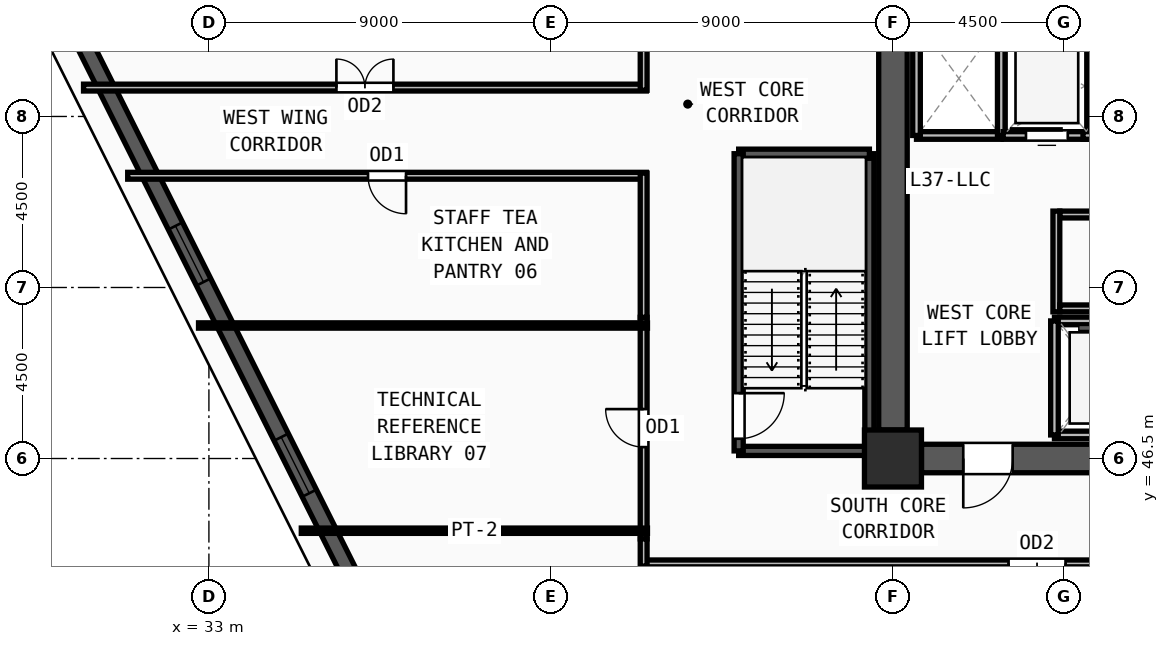
"""IFC4 building model, lengths in metres.
Left out: names, types, materials, properties, quantities, classifications, styles, units other than length and angle.
Written with IfcOpenShell. Run it as: python <this file> out.ifc"""

import sys

from ifc_helpers import new_model, si_unit, direction, frame, frame_2d, origin, origin_2d, place, context, subcontext, project, spatial, rectangle, extrude, source, transform, mapped, element, fill, save


model = new_model("IFC4")
c1 = context("Model", 3, precision=1e-05, world=origin(), true_north=direction((0.0, 1.0)))
c2 = subcontext(c1, "Body", "Model", "MODEL_VIEW")
j1 = project(units=[si_unit("LENGTHUNIT", "METRE"), si_unit("PLANEANGLEUNIT", "RADIAN")], contexts=[c1])
p1 = place(None, origin())
s1 = spatial("IfcSite", under=j1, at=p1, CompositionType="ELEMENT")
p2 = place(p1, origin())
s2 = spatial("IfcBuilding", under=s1, at=p2, CompositionType="ELEMENT")
p3 = place(p2, frame((0.0, 0.0, 144.0)))
s3 = spatial("IfcBuildingStorey", under=s2, at=p3, CompositionType="ELEMENT", Elevation=144.0)
m1 = source(origin(), c2, "Body", "SweptSolid", [
    extrude(rectangle(XDim=1.5, YDim=1.5, at=origin_2d()), origin(), (0.0, 0.0, 1.0), 3.75),
])
p4 = place(p3, frame((51.0, 46.5, 0.0), z_axis=(0.0, 0.0, 1.0), x_axis=(1.0, 0.0, 0.0)))
e1 = element("IfcColumn", 1, at=p4, inside=s3, PredefinedType="COLUMN", context=c2, shape_type="MappedRepresentation", body=[
    mapped(m1, transform((0.0, 0.0, 0.0), x_axis=(1.0, 0.0, 0.0), y_axis=(0.0, 1.0, 0.0), z_axis=(0.0, 0.0, 1.0), scale=1.0)),
])
p5 = place(p3, frame((24.842, 67.153, 0.0), z_axis=(0.0, 0.0, 1.0), x_axis=(0.447741761442, -0.894162913043, 0.0)))
e2 = element("IfcWall", 2, at=p5, inside=s3, PredefinedType="SOLIDWALL", context=c2, shape_type="SweptSolid", body=[
    extrude(rectangle(XDim=31.058, YDim=0.42, at=frame_2d((15.529, 0.0))), origin(), (0.0, 0.0, 1.0), 3.57),
])
m2 = source(origin(), c2, "Body", "SweptSolid", [
    extrude(rectangle(XDim=1.65, YDim=1.95, at=frame_2d((0.825, 0.975))), frame((0.0, 0.22, 0.0), z_axis=(0.0, -1.0, 0.0), x_axis=(1.0, 0.0, 0.0)), (0.0, 0.0, 1.0), 0.44),
])
p6 = place(p5, frame((6.94, 0.0, 0.55)))
e3 = element("IfcOpeningElement", 3, at=p6, cuts=e2, PredefinedType="OPENING", context=c2, shape_type="MappedRepresentation", body=[
    mapped(m2, transform((0.0, 0.0, 0.0), x_axis=(1.0, 0.0, 0.0), y_axis=(0.0, 1.0, 0.0), z_axis=(0.0, 0.0, 1.0), scale=1.0)),
])
p7 = place(p5, frame((16.254, 0.0, 0.55)))
e4 = element("IfcOpeningElement", 4, at=p7, cuts=e2, PredefinedType="OPENING", context=c2, shape_type="MappedRepresentation", body=[
    mapped(m2, transform((0.0, 0.0, 0.0), x_axis=(1.0, 0.0, 0.0), y_axis=(0.0, 1.0, 0.0), z_axis=(0.0, 0.0, 1.0), scale=1.0)),
])
p8 = place(p5, frame((22.469, 0.0, 0.55)))
e5 = element("IfcOpeningElement", 5, at=p8, cuts=e2, PredefinedType="OPENING", context=c2, shape_type="MappedRepresentation", body=[
    mapped(m2, transform((0.0, 0.0, 0.0), x_axis=(1.0, 0.0, 0.0), y_axis=(0.0, 1.0, 0.0), z_axis=(0.0, 0.0, 1.0), scale=1.0)),
])
p9 = place(p3, frame((59.25, 46.5, 0.0), z_axis=(0.0, 0.0, 1.0), x_axis=(-1.0, 0.0, 0.0)))
e6 = element("IfcWall", 6, at=p9, inside=s3, PredefinedType="SHEAR", context=c2, shape_type="SweptSolid", body=[
    extrude(rectangle(XDim=7.5, YDim=0.75, at=frame_2d((3.75, 0.0))), origin(), (0.0, 0.0, 1.0), 3.57),
])
m3 = source(origin(), c2, "Body", "SweptSolid", [
    extrude(rectangle(XDim=1.3, YDim=2.2, at=frame_2d((0.65, 1.1))), frame((0.0, 0.385, 0.0), z_axis=(0.0, -1.0, 0.0), x_axis=(1.0, 0.0, 0.0)), (0.0, 0.0, 1.0), 0.77),
])
p10 = place(p9, frame((5.1, 0.0, 0.0)))
e7 = element("IfcOpeningElement", 7, at=p10, cuts=e6, PredefinedType="OPENING", context=c2, shape_type="MappedRepresentation", body=[
    mapped(m3, transform((0.0, 0.0, 0.0), x_axis=(1.0, 0.0, 0.0), y_axis=(0.0, 1.0, 0.0), z_axis=(0.0, 0.0, 1.0), scale=1.0)),
])
m4 = source(origin(), c2, "Body", "SweptSolid", [
    extrude(rectangle(XDim=1.0, YDim=2.2, at=frame_2d((0.5, 1.1))), frame((0.0, 0.385, 0.0), z_axis=(0.0, -1.0, 0.0), x_axis=(1.0, 0.0, 0.0)), (0.0, 0.0, 1.0), 0.77),
])
p11 = place(p9, frame((0.6, 0.0, 0.0)))
e8 = element("IfcOpeningElement", 8, at=p11, cuts=e6, PredefinedType="OPENING", context=c2, shape_type="MappedRepresentation", body=[
    mapped(m4, transform((0.0, 0.0, 0.0), x_axis=(1.0, 0.0, 0.0), y_axis=(0.0, 1.0, 0.0), z_axis=(0.0, 0.0, 1.0), scale=1.0)),
])
p12 = place(p3, frame((51.0, 47.25, 0.0), z_axis=(0.0, 0.0, 1.0), x_axis=(0.0, 1.0, 0.0)))
e9 = element("IfcWall", 9, at=p12, inside=s3, PredefinedType="SHEAR", context=c2, shape_type="SweptSolid", body=[
    extrude(rectangle(XDim=13.5, YDim=0.75, at=frame_2d((6.75, 0.0))), origin(), (0.0, 0.0, 1.0), 3.57),
])
p13 = place(p3, frame((46.94, 46.7, 0.0), z_axis=(0.0, 0.0, 1.0), x_axis=(1.0, 0.0, 0.0)))
e10 = element("IfcWall", 10, at=p13, inside=s3, PredefinedType="SOLIDWALL", context=c2, shape_type="SweptSolid", body=[
    extrude(rectangle(XDim=3.44, YDim=0.24, at=frame_2d((1.72, 0.0))), origin(), (0.0, 0.0, 1.0), 3.57),
])
p14 = place(p3, frame((50.38, 46.7, 0.0), z_axis=(0.0, 0.0, 1.0), x_axis=(0.0, 1.0, 0.0)))
e11 = element("IfcWall", 11, at=p14, inside=s3, PredefinedType="SOLIDWALL", context=c2, shape_type="SweptSolid", body=[
    extrude(rectangle(XDim=7.82, YDim=0.24, at=frame_2d((3.91, 0.0))), origin(), (0.0, 0.0, 1.0), 3.57),
])
p15 = place(p3, frame((50.38, 54.52, 0.0), z_axis=(0.0, 0.0, 1.0), x_axis=(-1.0, 0.0, 0.0)))
e12 = element("IfcWall", 12, at=p15, inside=s3, PredefinedType="SOLIDWALL", context=c2, shape_type="SweptSolid", body=[
    extrude(rectangle(XDim=3.44, YDim=0.24, at=frame_2d((1.72, 0.0))), origin(), (0.0, 0.0, 1.0), 3.57),
])
p16 = place(p3, frame((46.94, 54.52, 0.0), z_axis=(0.0, 0.0, 1.0), x_axis=(0.0, -1.0, 0.0)))
e13 = element("IfcWall", 13, at=p16, inside=s3, PredefinedType="SOLIDWALL", context=c2, shape_type="SweptSolid", body=[
    extrude(rectangle(XDim=7.82, YDim=0.24, at=frame_2d((3.91, 0.0))), origin(), (0.0, 0.0, 1.0), 3.57),
])
m5 = source(origin(), c2, "Body", "SweptSolid", [
    extrude(rectangle(XDim=1.2, YDim=2.2, at=frame_2d((0.6, 1.1))), frame((0.0, 0.13, 0.0), z_axis=(0.0, -1.0, 0.0), x_axis=(1.0, 0.0, 0.0)), (0.0, 0.0, 1.0), 0.26),
])
p17 = place(p16, frame((6.3, 0.0, 0.0)))
e14 = element("IfcOpeningElement", 14, at=p17, cuts=e13, PredefinedType="OPENING", context=c2, shape_type="MappedRepresentation", body=[
    mapped(m5, transform((0.0, 0.0, 0.0), x_axis=(1.0, 0.0, 0.0), y_axis=(0.0, 1.0, 0.0), z_axis=(0.0, 0.0, 1.0), scale=1.0)),
])
for number, where, z_axis, x_axis in (
    (15, (55.25, 47.12, 0.0), (0.0, 0.0, 1.0), (1.0, 0.0, 0.0)),
    (16, (57.65, 50.12, 0.0), (0.0, 0.0, 1.0), (-1.0, 0.0, 0.0)),
):
    element("IfcWall", number, at=place(p3, frame(where, z_axis=z_axis, x_axis=x_axis)), inside=s3, PredefinedType="SOLIDWALL", context=c2, shape_type="SweptSolid", body=[
        extrude(rectangle(XDim=2.4, YDim=0.2, at=frame_2d((1.2, 0.0))), origin(), (0.0, 0.0, 1.0), 3.57),
    ])
p18 = place(p3, frame((55.25, 50.12, 0.0), z_axis=(0.0, 0.0, 1.0), x_axis=(0.0, -1.0, 0.0)))
e17 = element("IfcWall", 17, at=p18, inside=s3, PredefinedType="SOLIDWALL", context=c2, shape_type="SweptSolid", body=[
    extrude(rectangle(XDim=3.0, YDim=0.2, at=frame_2d((1.5, 0.0))), origin(), (0.0, 0.0, 1.0), 3.57),
])
p19 = place(p3, frame((51.62, 55.0, 0.0), z_axis=(0.0, 0.0, 1.0), x_axis=(1.0, 0.0, 0.0)))
e18 = element("IfcWall", 18, at=p19, inside=s3, PredefinedType="SOLIDWALL", context=c2, shape_type="SweptSolid", body=[
    extrude(rectangle(XDim=2.23, YDim=0.2, at=frame_2d((1.115, 0.0))), origin(), (0.0, 0.0, 1.0), 3.57),
])
for number, where, z_axis, x_axis in (
    (19, (53.85, 55.0, 0.0), (0.0, 0.0, 1.0), (0.0, 1.0, 0.0)),
    (20, (51.62, 58.0, 0.0), (0.0, 0.0, 1.0), (0.0, -1.0, 0.0)),
):
    element("IfcWall", number, at=place(p3, frame(where, z_axis=z_axis, x_axis=x_axis)), inside=s3, PredefinedType="SOLIDWALL", context=c2, shape_type="SweptSolid", body=[
        extrude(rectangle(XDim=3.0, YDim=0.2, at=frame_2d((1.5, 0.0))), origin(), (0.0, 0.0, 1.0), 3.57),
    ])
p20 = place(p3, frame((53.9, 55.0, 0.0), z_axis=(0.0, 0.0, 1.0), x_axis=(1.0, 0.0, 0.0)))
e21 = element("IfcWall", 21, at=p20, inside=s3, PredefinedType="SOLIDWALL", context=c2, shape_type="SweptSolid", body=[
    extrude(rectangle(XDim=2.3, YDim=0.2, at=frame_2d((1.15, 0.0))), origin(), (0.0, 0.0, 1.0), 3.57),
])
m6 = source(origin(), c2, "Body", "SweptSolid", [
    extrude(rectangle(XDim=1.1, YDim=2.2, at=frame_2d((0.55, 1.1))), frame((0.0, 0.11, 0.0), z_axis=(0.0, -1.0, 0.0), x_axis=(1.0, 0.0, 0.0)), (0.0, 0.0, 1.0), 0.22),
])
p21 = place(p20, frame((0.6, 0.0, 0.0)))
e22 = element("IfcOpeningElement", 22, at=p21, cuts=e21, PredefinedType="OPENING", context=c2, shape_type="MappedRepresentation", body=[
    mapped(m6, transform((0.0, 0.0, 0.0), x_axis=(1.0, 0.0, 0.0), y_axis=(0.0, 1.0, 0.0), z_axis=(0.0, 0.0, 1.0), scale=1.0)),
])
p22 = place(p3, frame((56.2, 55.0, 0.0), z_axis=(0.0, 0.0, 1.0), x_axis=(0.0, 1.0, 0.0)))
e23 = element("IfcWall", 23, at=p22, inside=s3, PredefinedType="SOLIDWALL", context=c2, shape_type="SweptSolid", body=[
    extrude(rectangle(XDim=2.6, YDim=0.2, at=frame_2d((1.3, 0.0))), origin(), (0.0, 0.0, 1.0), 3.57),
])
p23 = place(p3, frame((56.0, 55.0, 0.0), z_axis=(0.0, 0.0, 1.0), x_axis=(1.0, 0.0, 0.0)))
e24 = element("IfcWall", 24, at=p23, inside=s3, PredefinedType="SOLIDWALL", context=c2, shape_type="SweptSolid", body=[
    extrude(rectangle(XDim=2.2, YDim=0.2, at=frame_2d((1.1, 0.0))), origin(), (0.0, 0.0, 1.0), 3.57),
])
p24 = place(p23, frame((0.55, 0.0, 0.0)))
e25 = element("IfcOpeningElement", 25, at=p24, cuts=e24, PredefinedType="OPENING", context=c2, shape_type="MappedRepresentation", body=[
    mapped(m6, transform((0.0, 0.0, 0.0), x_axis=(1.0, 0.0, 0.0), y_axis=(0.0, 1.0, 0.0), z_axis=(0.0, 0.0, 1.0), scale=1.0)),
])
p25 = place(p3, frame((55.39, 52.92, 0.0), z_axis=(0.0, 0.0, 1.0), x_axis=(1.0, 0.0, 0.0)))
e26 = element("IfcWall", 26, at=p25, inside=s3, PredefinedType="PARTITIONING", context=c2, shape_type="SweptSolid", body=[
    extrude(rectangle(XDim=6.91, YDim=0.18, at=frame_2d((3.455, 0.0))), origin(), (0.0, 0.0, 1.0), 3.57),
])
m7 = source(origin(), c2, "Body", "SweptSolid", [
    extrude(rectangle(XDim=0.85, YDim=2.1, at=frame_2d((0.425, 1.05))), frame((0.0, 0.1, 0.0), z_axis=(0.0, -1.0, 0.0), x_axis=(1.0, 0.0, 0.0)), (0.0, 0.0, 1.0), 0.2),
])
p26 = place(p25, frame((3.035, 0.0, 0.0)))
e27 = element("IfcOpeningElement", 27, at=p26, cuts=e26, PredefinedType="OPENING", context=c2, shape_type="MappedRepresentation", body=[
    mapped(m7, transform((0.0, 0.0, 0.0), x_axis=(1.0, 0.0, 0.0), y_axis=(0.0, 1.0, 0.0), z_axis=(0.0, 0.0, 1.0), scale=1.0)),
])
p27 = place(p3, frame((29.701, 56.26, 0.0), z_axis=(0.0, 0.0, 1.0), x_axis=(1.0, 0.0, 0.0)))
e28 = element("IfcWall", 28, at=p27, inside=s3, PredefinedType="PARTITIONING", context=c2, shape_type="SweptSolid", body=[
    extrude(rectangle(XDim=14.809, YDim=0.18, at=frame_2d((7.405, 0.0))), origin(), (0.0, 0.0, 1.0), 3.57),
])
m8 = source(origin(), c2, "Body", "SweptSolid", [
    extrude(rectangle(XDim=1.5, YDim=2.2, at=frame_2d((0.75, 1.1))), frame((0.0, 0.1, 0.0), z_axis=(0.0, -1.0, 0.0), x_axis=(1.0, 0.0, 0.0)), (0.0, 0.0, 1.0), 0.2),
])
p28 = place(p27, frame((6.654, 0.0, 0.0)))
e29 = element("IfcOpeningElement", 29, at=p28, cuts=e28, PredefinedType="OPENING", context=c2, shape_type="MappedRepresentation", body=[
    mapped(m8, transform((0.0, 0.0, 0.0), x_axis=(1.0, 0.0, 0.0), y_axis=(0.0, 1.0, 0.0), z_axis=(0.0, 0.0, 1.0), scale=1.0)),
])
p29 = place(p3, frame((44.51, 53.94, 0.0), z_axis=(0.0, 0.0, 1.0), x_axis=(-1.0, 0.0, 0.0)))
e30 = element("IfcWall", 30, at=p29, inside=s3, PredefinedType="PARTITIONING", context=c2, shape_type="SweptSolid", body=[
    extrude(rectangle(XDim=13.647, YDim=0.18, at=frame_2d((6.823, 0.0))), origin(), (0.0, 0.0, 1.0), 3.57),
])
m9 = source(origin(), c2, "Body", "SweptSolid", [
    extrude(rectangle(XDim=1.0, YDim=2.2, at=frame_2d((0.5, 1.1))), frame((0.0, 0.1, 0.0), z_axis=(0.0, -1.0, 0.0), x_axis=(1.0, 0.0, 0.0)), (0.0, 0.0, 1.0), 0.2),
])
p30 = place(p29, frame((6.323, 0.0, 0.0)))
e31 = element("IfcOpeningElement", 31, at=p30, cuts=e30, PredefinedType="OPENING", context=c2, shape_type="MappedRepresentation", body=[
    mapped(m9, transform((0.0, 0.0, 0.0), x_axis=(1.0, 0.0, 0.0), y_axis=(0.0, 1.0, 0.0), z_axis=(0.0, 0.0, 1.0), scale=1.0)),
])
p31 = place(p3, frame((44.44, 44.385, 0.0), z_axis=(0.0, 0.0, 1.0), x_axis=(0.0, 1.0, 0.0)))
e32 = element("IfcWall", 32, at=p31, inside=s3, PredefinedType="PARTITIONING", context=c2, shape_type="SweptSolid", body=[
    extrude(rectangle(XDim=5.83, YDim=0.18, at=frame_2d((2.915, 0.0))), origin(), (0.0, 0.0, 1.0), 3.57),
])
p32 = place(p31, frame((2.415, 0.0, 0.0)))
e33 = element("IfcOpeningElement", 33, at=p32, cuts=e32, PredefinedType="OPENING", context=c2, shape_type="MappedRepresentation", body=[
    mapped(m9, transform((0.0, 0.0, 0.0), x_axis=(1.0, 0.0, 0.0), y_axis=(0.0, 1.0, 0.0), z_axis=(0.0, 0.0, 1.0), scale=1.0)),
])
p33 = place(p3, frame((65.215, 43.74, 0.0), z_axis=(0.0, 0.0, 1.0), x_axis=(-1.0, 0.0, 0.0)))
e34 = element("IfcWall", 34, at=p33, inside=s3, PredefinedType="PARTITIONING", context=c2, shape_type="SweptSolid", body=[
    extrude(rectangle(XDim=20.845, YDim=0.18, at=frame_2d((10.422, 0.0))), origin(), (0.0, 0.0, 1.0), 3.57),
])
p34 = place(p33, frame((9.673, 0.0, 0.0)))
e35 = element("IfcOpeningElement", 35, at=p34, cuts=e34, PredefinedType="OPENING", context=c2, shape_type="MappedRepresentation", body=[
    mapped(m8, transform((0.0, 0.0, 0.0), x_axis=(1.0, 0.0, 0.0), y_axis=(0.0, 1.0, 0.0), z_axis=(0.0, 0.0, 1.0), scale=1.0)),
])
p35 = place(p3, frame((44.44, 56.19, 0.0), z_axis=(0.0, 0.0, 1.0), x_axis=(0.0, 1.0, 0.0)))
e36 = element("IfcWall", 36, at=p35, inside=s3, PredefinedType="PARTITIONING", context=c2, shape_type="SweptSolid", body=[
    extrude(rectangle(XDim=10.595, YDim=0.18, at=frame_2d((5.297, 0.0))), origin(), (0.0, 0.0, 1.0), 3.57),
])
p36 = place(p3, frame((44.44, 50.215, 0.0), z_axis=(0.0, 0.0, 1.0), x_axis=(0.0, 1.0, 0.0)))
e37 = element("IfcWall", 37, at=p36, inside=s3, PredefinedType="PARTITIONING", context=c2, shape_type="SweptSolid", body=[
    extrude(rectangle(XDim=3.795, YDim=0.18, at=frame_2d((1.897, 0.0))), origin(), (0.0, 0.0, 1.0), 3.57),
])
p37 = place(p3, frame((44.44, 43.67, 0.0), z_axis=(0.0, 0.0, 1.0), x_axis=(0.0, 1.0, 0.0)))
e38 = element("IfcWall", 38, at=p37, inside=s3, PredefinedType="PARTITIONING", context=c2, shape_type="SweptSolid", body=[
    extrude(rectangle(XDim=0.715, YDim=0.18, at=frame_2d((0.357, 0.0))), origin(), (0.0, 0.0, 1.0), 3.57),
])
p38 = place(p3, frame((44.54, 44.6, 0.0), z_axis=(0.0, 0.0, 1.0), x_axis=(-1.0, 0.0, 0.0)))
e39 = element("IfcWall", 39, at=p38, inside=s3, PredefinedType="PARTITIONING", context=c2, shape_type="SweptSolid", body=[
    extrude(rectangle(XDim=9.109, YDim=0.14, at=frame_2d((4.555, 0.0))), origin(), (0.0, 0.0, 1.0), 3.57),
])
p39 = place(p3, frame((44.54, 50.0, 0.0), z_axis=(0.0, 0.0, 1.0), x_axis=(-1.0, 0.0, 0.0)))
e40 = element("IfcWall", 40, at=p39, inside=s3, PredefinedType="PARTITIONING", context=c2, shape_type="SweptSolid", body=[
    extrude(rectangle(XDim=11.813, YDim=0.14, at=frame_2d((5.906, 0.0))), origin(), (0.0, 0.0, 1.0), 3.57),
])
p40 = place(p3, frame((55.3, 50.36, 0.0), z_axis=(0.0, 0.0, 1.0), x_axis=(0.0, 1.0, 0.0)))
e41 = element("IfcWall", 41, at=p40, inside=s3, PredefinedType="PARTITIONING", context=c2, shape_type="SweptSolid", body=[
    extrude(rectangle(XDim=2.65, YDim=0.18, at=frame_2d((1.325, 0.0))), origin(), (0.0, 0.0, 1.0), 3.57),
])
p41 = place(p3, frame((55.39, 50.45, 0.0), z_axis=(0.0, 0.0, 1.0), x_axis=(1.0, 0.0, 0.0)))
e42 = element("IfcWall", 42, at=p41, inside=s3, PredefinedType="PARTITIONING", context=c2, shape_type="SweptSolid", body=[
    extrude(rectangle(XDim=6.91, YDim=0.18, at=frame_2d((3.455, 0.0))), origin(), (0.0, 0.0, 1.0), 3.57),
])
m10 = source(origin(), c2, "Body", "SweptSolid", [
    extrude(rectangle(XDim=1.65, YDim=1.95, at=frame_2d((0.825, 0.975))), frame((0.0, 0.03, 0.0), z_axis=(0.0, -1.0, 0.0), x_axis=(1.0, 0.0, 0.0)), (0.0, 0.0, 1.0), 0.06),
])
p42 = place(p7, origin())
e43 = element("IfcWindow", 43, at=p42, inside=s3, PartitioningType="DOUBLE_PANEL_VERTICAL", PredefinedType="WINDOW", context=c2, shape_type="MappedRepresentation", body=[
    mapped(m10, transform((0.0, 0.0, 0.0), x_axis=(1.0, 0.0, 0.0), y_axis=(0.0, 1.0, 0.0), z_axis=(0.0, 0.0, 1.0), scale=1.0)),
])
fill(e4, e43)
p43 = place(p8, origin())
e44 = element("IfcWindow", 44, at=p43, inside=s3, PartitioningType="DOUBLE_PANEL_VERTICAL", PredefinedType="WINDOW", context=c2, shape_type="MappedRepresentation", body=[
    mapped(m10, transform((0.0, 0.0, 0.0), x_axis=(1.0, 0.0, 0.0), y_axis=(0.0, 1.0, 0.0), z_axis=(0.0, 0.0, 1.0), scale=1.0)),
])
fill(e5, e44)
m11 = source(origin(), c2, "Body", "SweptSolid", [
    extrude(rectangle(XDim=1.3, YDim=2.2, at=frame_2d((0.65, 1.1))), frame((0.0, 0.025, 0.0), z_axis=(0.0, -1.0, 0.0), x_axis=(1.0, 0.0, 0.0)), (0.0, 0.0, 1.0), 0.05),
])
p44 = place(p10, origin())
e45 = element("IfcDoor", 45, at=p44, inside=s3, OperationType="SINGLE_SWING_RIGHT", PredefinedType="DOOR", context=c2, shape_type="MappedRepresentation", body=[
    mapped(m11, transform((0.0, 0.0, 0.0), x_axis=(1.0, 0.0, 0.0), y_axis=(0.0, 1.0, 0.0), z_axis=(0.0, 0.0, 1.0), scale=1.0)),
])
fill(e7, e45)
m12 = source(origin(), c2, "Body", "SweptSolid", [
    extrude(rectangle(XDim=1.2, YDim=2.2, at=frame_2d((0.6, 1.1))), frame((0.0, 0.025, 0.0), z_axis=(0.0, -1.0, 0.0), x_axis=(1.0, 0.0, 0.0)), (0.0, 0.0, 1.0), 0.05),
])
p45 = place(p17, origin())
e46 = element("IfcDoor", 46, at=p45, inside=s3, OperationType="SINGLE_SWING_LEFT", PredefinedType="DOOR", context=c2, shape_type="MappedRepresentation", body=[
    mapped(m12, transform((0.0, 0.0, 0.0), x_axis=(1.0, 0.0, 0.0), y_axis=(0.0, 1.0, 0.0), z_axis=(0.0, 0.0, 1.0), scale=1.0)),
])
fill(e14, e46)
m13 = source(origin(), c2, "Body", "SweptSolid", [
    extrude(rectangle(XDim=1.1, YDim=2.2, at=frame_2d((0.55, 1.1))), frame((0.0, 0.025, 0.0), z_axis=(0.0, -1.0, 0.0), x_axis=(1.0, 0.0, 0.0)), (0.0, 0.0, 1.0), 0.05),
])
p46 = place(p21, origin())
e47 = element("IfcDoor", 47, at=p46, inside=s3, OperationType="SLIDING_TO_LEFT", PredefinedType="DOOR", context=c2, shape_type="MappedRepresentation", body=[
    mapped(m13, transform((0.0, 0.0, 0.0), x_axis=(1.0, 0.0, 0.0), y_axis=(0.0, 1.0, 0.0), z_axis=(0.0, 0.0, 1.0), scale=1.0)),
])
fill(e22, e47)
m14 = source(origin(), c2, "Body", "SweptSolid", [
    extrude(rectangle(XDim=1.5, YDim=2.2, at=frame_2d((0.75, 1.1))), frame((0.0, 0.025, 0.0), z_axis=(0.0, -1.0, 0.0), x_axis=(1.0, 0.0, 0.0)), (0.0, 0.0, 1.0), 0.05),
])
p47 = place(p28, origin())
e48 = element("IfcDoor", 48, at=p47, inside=s3, OperationType="DOUBLE_DOOR_SINGLE_SWING", PredefinedType="DOOR", context=c2, shape_type="MappedRepresentation", body=[
    mapped(m14, transform((0.0, 0.0, 0.0), x_axis=(1.0, 0.0, 0.0), y_axis=(0.0, 1.0, 0.0), z_axis=(0.0, 0.0, 1.0), scale=1.0)),
])
fill(e29, e48)
m15 = source(origin(), c2, "Body", "SweptSolid", [
    extrude(rectangle(XDim=1.0, YDim=2.2, at=frame_2d((0.5, 1.1))), frame((0.0, 0.025, 0.0), z_axis=(0.0, -1.0, 0.0), x_axis=(1.0, 0.0, 0.0)), (0.0, 0.0, 1.0), 0.05),
])
p48 = place(p30, origin())
e49 = element("IfcDoor", 49, at=p48, inside=s3, OperationType="SINGLE_SWING_LEFT", PredefinedType="DOOR", context=c2, shape_type="MappedRepresentation", body=[
    mapped(m15, transform((0.0, 0.0, 0.0), x_axis=(1.0, 0.0, 0.0), y_axis=(0.0, 1.0, 0.0), z_axis=(0.0, 0.0, 1.0), scale=1.0)),
])
fill(e31, e49)
p49 = place(p32, origin())
e50 = element("IfcDoor", 50, at=p49, inside=s3, OperationType="SINGLE_SWING_RIGHT", PredefinedType="DOOR", context=c2, shape_type="MappedRepresentation", body=[
    mapped(m15, transform((0.0, 0.0, 0.0), x_axis=(1.0, 0.0, 0.0), y_axis=(0.0, 1.0, 0.0), z_axis=(0.0, 0.0, 1.0), scale=1.0)),
])
fill(e33, e50)
p50 = place(p34, origin())
e51 = element("IfcDoor", 51, at=p50, inside=s3, OperationType="DOUBLE_DOOR_SINGLE_SWING", PredefinedType="DOOR", context=c2, shape_type="MappedRepresentation", body=[
    mapped(m14, transform((0.0, 0.0, 0.0), x_axis=(1.0, 0.0, 0.0), y_axis=(0.0, 1.0, 0.0), z_axis=(0.0, 0.0, 1.0), scale=1.0)),
])
fill(e35, e51)
save(model, sys.argv[1])
